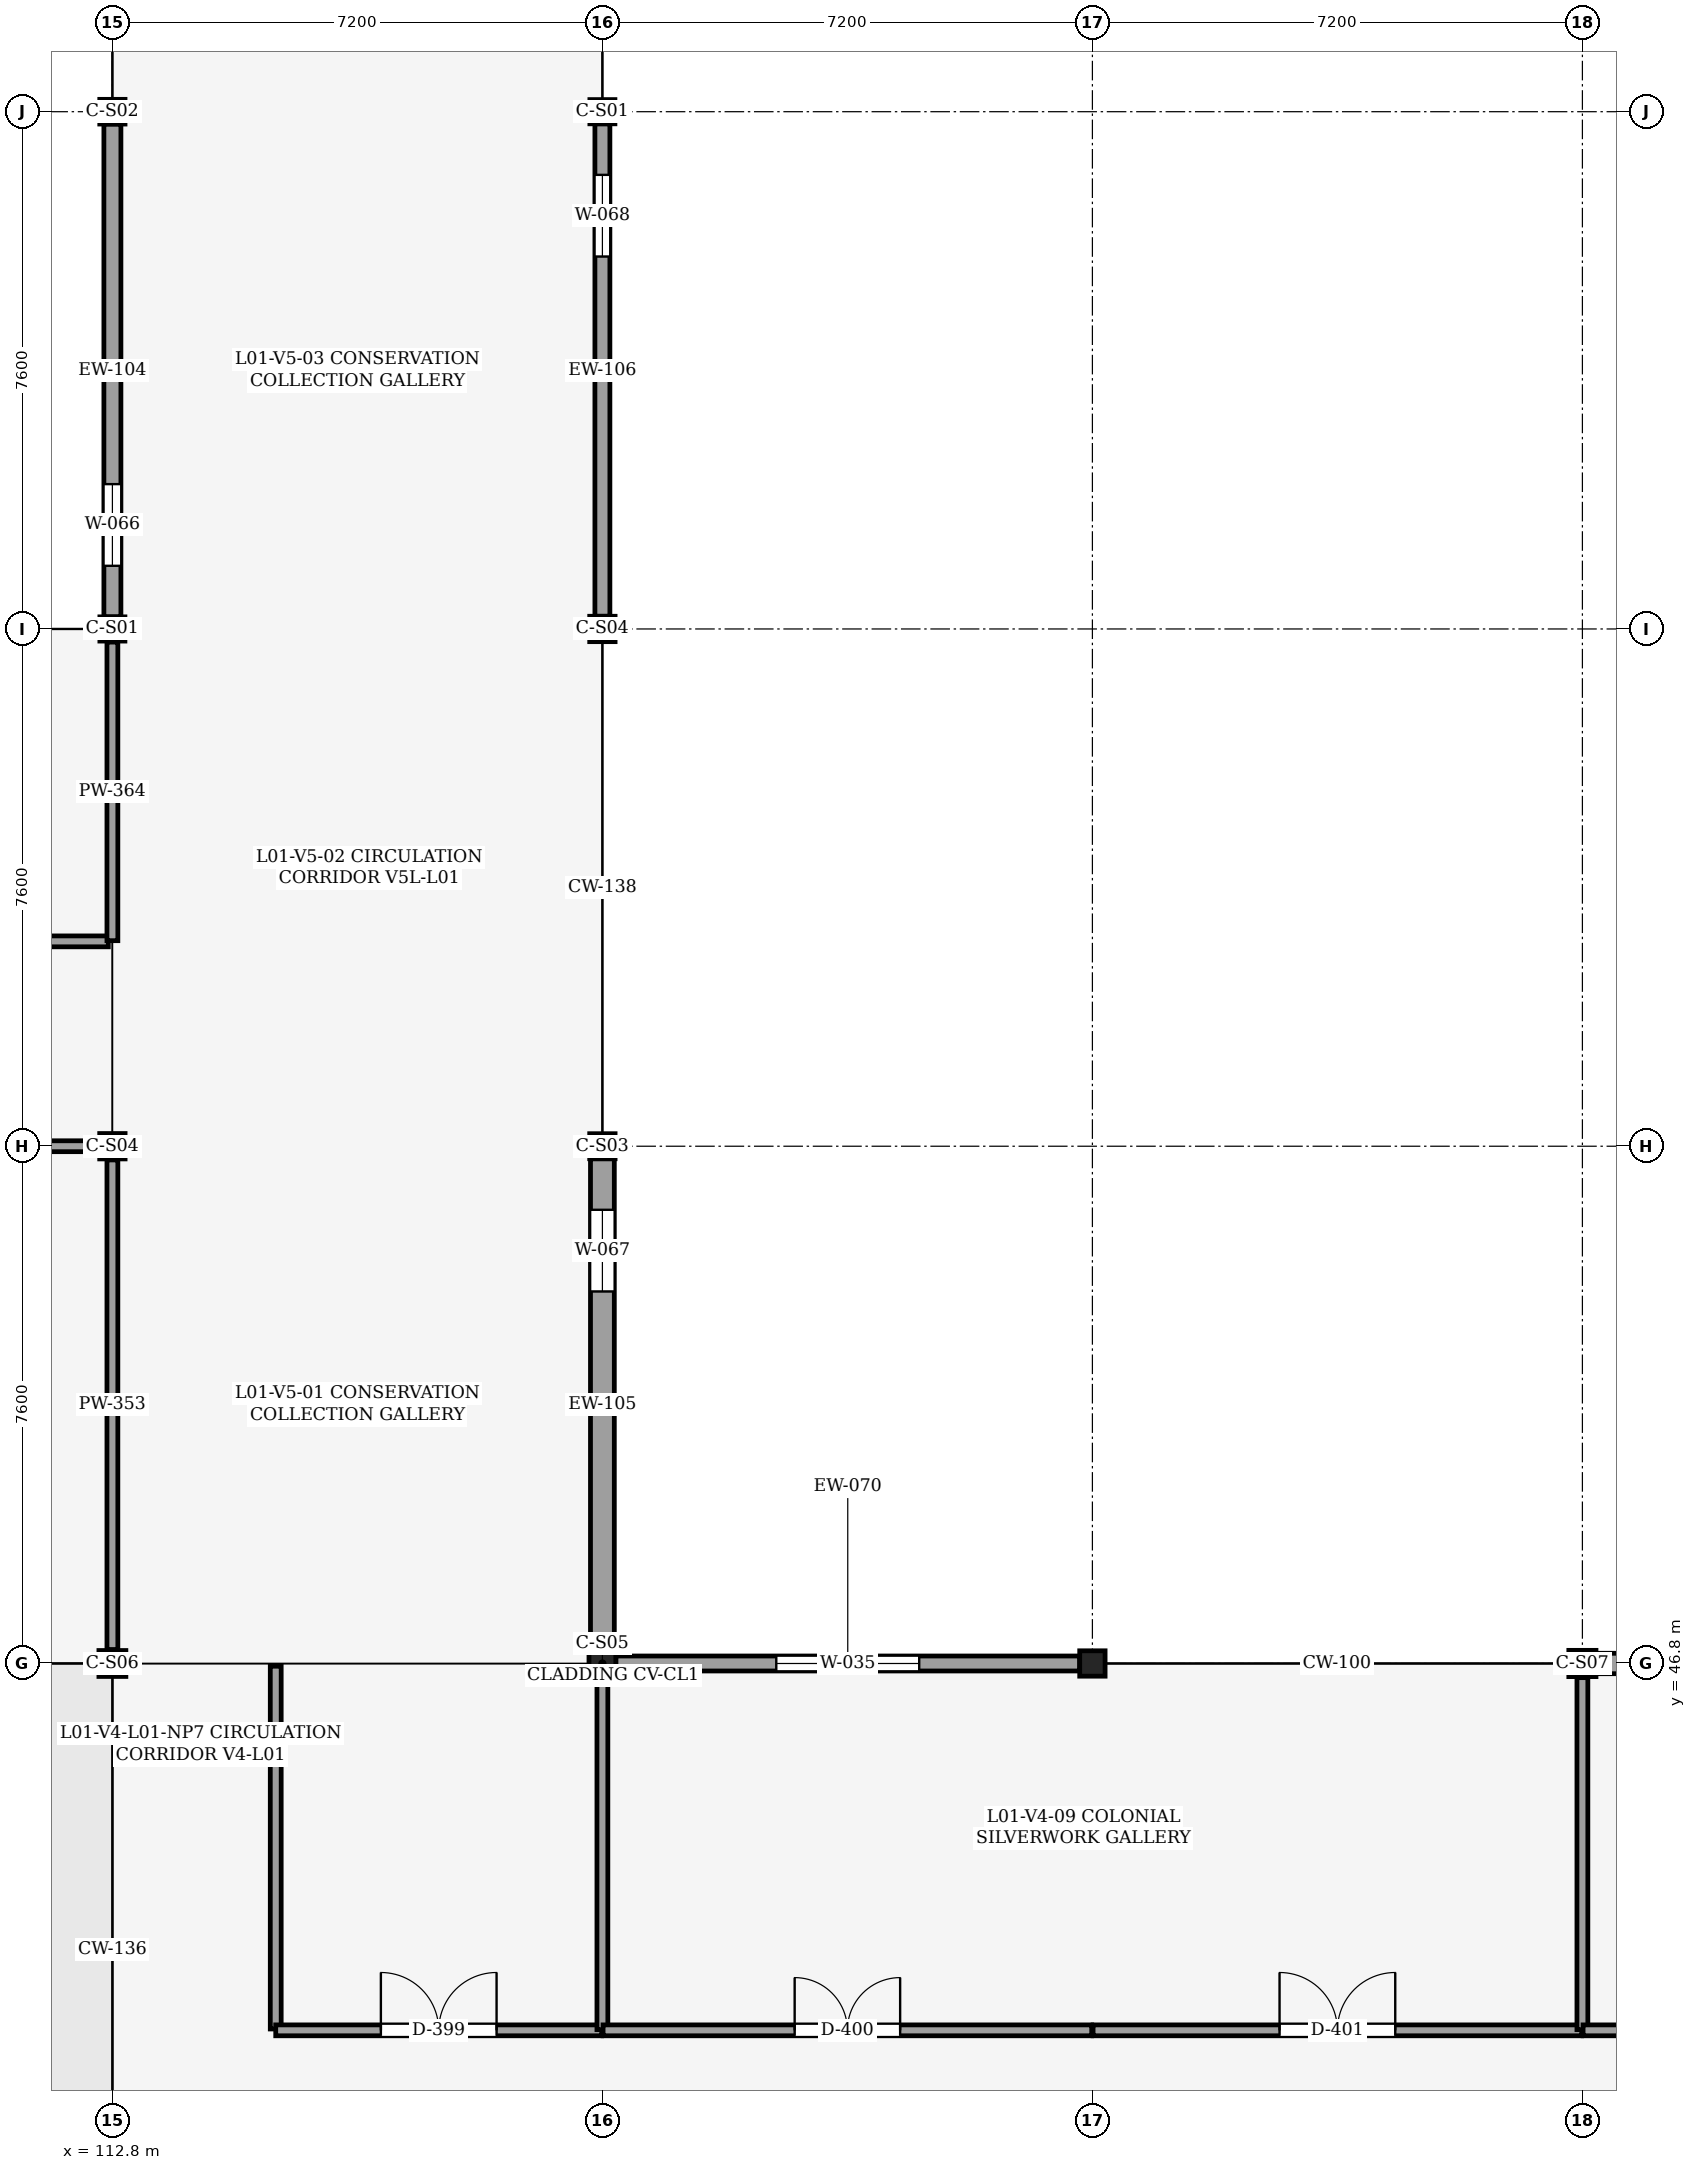
"""IFC4 building model, lengths in metres.
Left out: names, types, materials, properties, quantities, classifications, styles, units other than length and angle.
Written with IfcOpenShell. Run it as: python <this file> out.ifc"""

import sys

from ifc_helpers import new_model, si_unit, direction, frame, frame_2d, origin, origin_2d, place, context, subcontext, project, spatial, rectangle, i_section, extrude, element, fill, save


model = new_model("IFC4")
c1 = context("Model", 3, precision=1e-05, world=origin(), true_north=direction((0.0, 1.0)))
c2 = subcontext(c1, "Body", "Model", "MODEL_VIEW")
j1 = project(units=[si_unit("LENGTHUNIT", "METRE"), si_unit("PLANEANGLEUNIT", "RADIAN")], contexts=[c1])
p1 = place(None, origin())
s1 = spatial("IfcSite", under=j1, at=p1, CompositionType="ELEMENT")
p2 = place(p1, origin())
s2 = spatial("IfcBuilding", under=s1, at=p2, CompositionType="ELEMENT")
p3 = place(p2, frame((0.0, 0.0, 5.4)))
s3 = spatial("IfcBuildingStorey", under=s2, at=p3, CompositionType="ELEMENT", Elevation=5.4)
p4 = place(p3, frame((112.8, 46.8, 0.0), z_axis=(0.0, 0.0, 1.0), x_axis=(1.0, 0.0, 0.0)))
e1 = element("IfcColumn", 1, at=p4, inside=s3, PredefinedType="COLUMN", context=c2, shape_type="SweptSolid", body=[
    extrude(i_section(OverallWidth=0.396, OverallDepth=0.381, WebThickness=0.019, FlangeThickness=0.03, FilletRadius=0.025, at=origin_2d()), origin(), (0.0, 0.0, 1.0), 4.8),
])
p5 = place(p3, frame((112.8, 54.4, 0.0), z_axis=(0.0, 0.0, 1.0), x_axis=(1.0, 0.0, 0.0)))
e2 = element("IfcColumn", 2, at=p5, inside=s3, PredefinedType="COLUMN", context=c2, shape_type="SweptSolid", body=[
    extrude(i_section(OverallWidth=0.373, OverallDepth=0.373, WebThickness=0.016, FlangeThickness=0.026, FilletRadius=0.025, at=origin_2d()), origin(), (0.0, 0.0, 1.0), 4.8),
])
p6 = place(p3, frame((112.8, 62.0, 0.0), z_axis=(0.0, 0.0, 1.0), x_axis=(1.0, 0.0, 0.0)))
e3 = element("IfcColumn", 3, at=p6, inside=s3, PredefinedType="COLUMN", context=c2, shape_type="SweptSolid", body=[
    extrude(i_section(OverallWidth=0.368, OverallDepth=0.356, WebThickness=0.011, FlangeThickness=0.018, FilletRadius=0.025, at=origin_2d()), origin(), (0.0, 0.0, 1.0), 4.8),
])
p7 = place(p3, frame((112.8, 69.6, 0.0), z_axis=(0.0, 0.0, 1.0), x_axis=(1.0, 0.0, 0.0)))
e4 = element("IfcColumn", 4, at=p7, inside=s3, PredefinedType="COLUMN", context=c2, shape_type="SweptSolid", body=[
    extrude(i_section(OverallWidth=0.371, OverallDepth=0.363, WebThickness=0.013, FlangeThickness=0.022, FilletRadius=0.025, at=origin_2d()), origin(), (0.0, 0.0, 1.0), 4.8),
])
p8 = place(p3, frame((120.0, 46.8, 0.0), z_axis=(0.0, 0.0, 1.0), x_axis=(1.0, 0.0, 0.0)))
e5 = element("IfcColumn", 5, at=p8, inside=s3, PredefinedType="COLUMN", context=c2, shape_type="SweptSolid", body=[
    extrude(i_section(OverallWidth=0.394, OverallDepth=0.376, WebThickness=0.017, FlangeThickness=0.028, FilletRadius=0.025, at=origin_2d()), origin(), (0.0, 0.0, 1.0), 4.8),
])
p9 = place(p3, frame((120.0, 54.4, 0.0), z_axis=(0.0, 0.0, 1.0), x_axis=(1.0, 0.0, 0.0)))
e6 = element("IfcColumn", 6, at=p9, inside=s3, PredefinedType="COLUMN", context=c2, shape_type="SweptSolid", body=[
    extrude(i_section(OverallWidth=0.373, OverallDepth=0.368, WebThickness=0.015, FlangeThickness=0.024, FilletRadius=0.025, at=origin_2d()), origin(), (0.0, 0.0, 1.0), 4.8),
])
p10 = place(p3, frame((120.0, 62.0, 0.0), z_axis=(0.0, 0.0, 1.0), x_axis=(1.0, 0.0, 0.0)))
e7 = element("IfcColumn", 7, at=p10, inside=s3, PredefinedType="COLUMN", context=c2, shape_type="SweptSolid", body=[
    extrude(i_section(OverallWidth=0.373, OverallDepth=0.373, WebThickness=0.016, FlangeThickness=0.026, FilletRadius=0.025, at=origin_2d()), origin(), (0.0, 0.0, 1.0), 4.8),
])
p11 = place(p3, frame((120.0, 69.6, 0.0), z_axis=(0.0, 0.0, 1.0), x_axis=(1.0, 0.0, 0.0)))
e8 = element("IfcColumn", 8, at=p11, inside=s3, PredefinedType="COLUMN", context=c2, shape_type="SweptSolid", body=[
    extrude(i_section(OverallWidth=0.368, OverallDepth=0.356, WebThickness=0.011, FlangeThickness=0.018, FilletRadius=0.025, at=origin_2d()), origin(), (0.0, 0.0, 1.0), 4.8),
])
p12 = place(p3, frame((127.2, 46.8, 0.0), z_axis=(0.0, 0.0, 1.0), x_axis=(1.0, 0.0, 0.0)))
e9 = element("IfcColumn", 9, at=p12, inside=s3, PredefinedType="COLUMN", context=c2, shape_type="SweptSolid", body=[
    extrude(i_section(OverallWidth=0.373, OverallDepth=0.373, WebThickness=0.016, FlangeThickness=0.026, FilletRadius=0.025, at=origin_2d()), origin(), (0.0, 0.0, 1.0), 4.8),
])
p13 = place(p3, frame((134.4, 46.8, 0.0), z_axis=(0.0, 0.0, 1.0), x_axis=(1.0, 0.0, 0.0)))
e10 = element("IfcColumn", 10, at=p13, inside=s3, PredefinedType="COLUMN", context=c2, shape_type="SweptSolid", body=[
    extrude(i_section(OverallWidth=0.399, OverallDepth=0.386, WebThickness=0.021, FlangeThickness=0.033, FilletRadius=0.025, at=origin_2d()), origin(), (0.0, 0.0, 1.0), 4.8),
])
p14 = place(p3, frame((120.197, 46.8, 0.0), z_axis=(0.0, 0.0, 1.0), x_axis=(1.0, 0.0, 0.0)))
e11 = element("IfcWall", 11, at=p14, inside=s3, PredefinedType="SOLIDWALL", context=c2, shape_type="SweptSolid", body=[
    extrude(rectangle(XDim=6.816, YDim=0.22, at=frame_2d((3.408, 0.0))), origin(), (0.0, 0.0, 1.0), 4.215),
])
p15 = place(p14, frame((2.358, 0.0, 0.9)))
e12 = element("IfcOpeningElement", 12, at=p15, cuts=e11, PredefinedType="OPENING", context=c2, shape_type="SweptSolid", body=[
    extrude(rectangle(XDim=2.1, YDim=1.75, at=frame_2d((1.05, 0.875))), frame((0.0, 0.12, 0.0), z_axis=(0.0, -1.0, 0.0), x_axis=(1.0, 0.0, 0.0)), (0.0, 0.0, 1.0), 0.24),
])
p16 = place(p3, frame((134.6, 46.8, 0.0), z_axis=(0.0, 0.0, 1.0), x_axis=(1.0, 0.0, 0.0)))
e13 = element("IfcWall", 13, at=p16, inside=s3, PredefinedType="SOLIDWALL", context=c2, shape_type="SweptSolid", body=[
    extrude(rectangle(XDim=6.802, YDim=0.3, at=frame_2d((3.401, 0.0))), origin(), (0.0, 0.0, 1.0), 3.987),
])
p17 = place(p16, frame((2.201, 0.0, 0.9)))
e14 = element("IfcOpeningElement", 14, at=p17, cuts=e13, PredefinedType="OPENING", context=c2, shape_type="SweptSolid", body=[
    extrude(rectangle(XDim=2.4, YDim=1.75, at=frame_2d((1.2, 0.875))), frame((0.0, 0.16, 0.0), z_axis=(0.0, -1.0, 0.0), x_axis=(1.0, 0.0, 0.0)), (0.0, 0.0, 1.0), 0.321),
])
p18 = place(p3, frame((112.8, 62.178, 0.0), z_axis=(0.0, 0.0, 1.0), x_axis=(0.0, 1.0, 0.0)))
e15 = element("IfcWall", 15, at=p18, inside=s3, PredefinedType="SOLIDWALL", context=c2, shape_type="SweptSolid", body=[
    extrude(rectangle(XDim=7.24, YDim=0.25, at=frame_2d((3.62, 0.0))), origin(), (0.0, 0.0, 1.0), 3.913),
])
p19 = place(p18, frame((0.75, 0.0, 0.9)))
e16 = element("IfcOpeningElement", 16, at=p19, cuts=e15, PredefinedType="OPENING", context=c2, shape_type="SweptSolid", body=[
    extrude(rectangle(XDim=1.2, YDim=1.5, at=frame_2d((0.6, 0.75))), frame((0.0, 0.135, 0.0), z_axis=(0.0, -1.0, 0.0), x_axis=(1.0, 0.0, 0.0)), (0.0, 0.0, 1.0), 0.271),
])
p20 = place(p3, frame((120.0, 54.216, 0.0), z_axis=(0.0, 0.0, 1.0), x_axis=(0.0, -1.0, 0.0)))
e17 = element("IfcWall", 17, at=p20, inside=s3, PredefinedType="SOLIDWALL", context=c2, shape_type="SweptSolid", body=[
    extrude(rectangle(XDim=7.228, YDim=0.35, at=frame_2d((3.614, 0.0))), origin(), (0.0, 0.0, 1.0), 3.908),
])
p21 = place(p20, frame((0.75, 0.0, 0.9)))
e18 = element("IfcOpeningElement", 18, at=p21, cuts=e17, PredefinedType="OPENING", context=c2, shape_type="SweptSolid", body=[
    extrude(rectangle(XDim=1.2, YDim=1.5, at=frame_2d((0.6, 0.75))), frame((0.0, 0.185, 0.0), z_axis=(0.0, -1.0, 0.0), x_axis=(1.0, 0.0, 0.0)), (0.0, 0.0, 1.0), 0.371),
])
p22 = place(p3, frame((120.0, 69.422, 0.0), z_axis=(0.0, 0.0, 1.0), x_axis=(0.0, -1.0, 0.0)))
e19 = element("IfcWall", 19, at=p22, inside=s3, PredefinedType="SOLIDWALL", context=c2, shape_type="SweptSolid", body=[
    extrude(rectangle(XDim=7.236, YDim=0.22, at=frame_2d((3.618, 0.0))), origin(), (0.0, 0.0, 1.0), 3.987),
])
p23 = place(p22, frame((0.75, 0.0, 0.9)))
e20 = element("IfcOpeningElement", 20, at=p23, cuts=e19, PredefinedType="OPENING", context=c2, shape_type="SweptSolid", body=[
    extrude(rectangle(XDim=1.2, YDim=1.5, at=frame_2d((0.6, 0.75))), frame((0.0, 0.12, 0.0), z_axis=(0.0, -1.0, 0.0), x_axis=(1.0, 0.0, 0.0)), (0.0, 0.0, 1.0), 0.24),
])
p24 = place(p3, frame((104.542, 54.4, 0.0), z_axis=(0.0, 0.0, 1.0), x_axis=(1.0, 0.0, 0.0)))
e21 = element("IfcWall", 21, at=p24, inside=s3, PredefinedType="PARTITIONING", context=c2, shape_type="SweptSolid", body=[
    extrude(rectangle(XDim=8.056, YDim=0.16, at=frame_2d((4.028, 0.0))), origin(), (0.0, 0.0, 1.0), 3.758),
])
p25 = place(p24, frame((3.253, 0.0, 0.0)))
e22 = element("IfcOpeningElement", 22, at=p25, cuts=e21, PredefinedType="OPENING", context=c2, shape_type="SweptSolid", body=[
    extrude(rectangle(XDim=1.55, YDim=2.3, at=frame_2d((0.775, 1.15))), frame((0.0, 0.09, 0.0), z_axis=(0.0, -1.0, 0.0), x_axis=(1.0, 0.0, 0.0)), (0.0, 0.0, 1.0), 0.18),
])
p26 = place(p3, frame((112.8, 47.006, 0.0), z_axis=(0.0, 0.0, 1.0), x_axis=(0.0, 1.0, 0.0)))
e23 = element("IfcWall", 23, at=p26, inside=s3, PredefinedType="PARTITIONING", context=c2, shape_type="SweptSolid", body=[
    extrude(rectangle(XDim=7.193, YDim=0.16, at=frame_2d((3.596, 0.0))), origin(), (0.0, 0.0, 1.0), 4.058),
])
p27 = place(p3, frame((104.41, 57.41, 0.0), z_axis=(0.0, 0.0, 1.0), x_axis=(1.0, 0.0, 0.0)))
e24 = element("IfcWall", 24, at=p27, inside=s3, PredefinedType="PARTITIONING", context=c2, shape_type="SweptSolid", body=[
    extrude(rectangle(XDim=8.33, YDim=0.16, at=frame_2d((4.165, 0.0))), origin(), (0.0, 0.0, 1.0), 4.52),
])
p28 = place(p27, frame((3.64, 0.0, 0.0)))
e25 = element("IfcOpeningElement", 25, at=p28, cuts=e24, PredefinedType="OPENING", context=c2, shape_type="SweptSolid", body=[
    extrude(rectangle(XDim=1.05, YDim=2.15, at=frame_2d((0.525, 1.075))), frame((0.0, 0.09, 0.0), z_axis=(0.0, -1.0, 0.0), x_axis=(1.0, 0.0, 0.0)), (0.0, 0.0, 1.0), 0.18),
])
p29 = place(p3, frame((112.8, 57.42, 0.0), z_axis=(0.0, 0.0, 1.0), x_axis=(0.0, 1.0, 0.0)))
e26 = element("IfcWall", 26, at=p29, inside=s3, PredefinedType="PARTITIONING", context=c2, shape_type="SweptSolid", body=[
    extrude(rectangle(XDim=4.387, YDim=0.16, at=frame_2d((2.193, 0.0))), origin(), (0.0, 0.0, 1.0), 3.908),
])
p30 = place(p3, frame((115.2, 41.43, 0.0), z_axis=(0.0, 0.0, 1.0), x_axis=(0.0, 1.0, 0.0)))
e27 = element("IfcWall", 27, at=p30, inside=s3, PredefinedType="PARTITIONING", context=c2, shape_type="SweptSolid", body=[
    extrude(rectangle(XDim=5.33, YDim=0.16, at=frame_2d((2.665, 0.0))), origin(), (0.0, 0.0, 1.0), 4.52),
])
p31 = place(p3, frame((115.2, 41.41, 0.0), z_axis=(0.0, 0.0, 1.0), x_axis=(1.0, 0.0, 0.0)))
e28 = element("IfcWall", 28, at=p31, inside=s3, PredefinedType="PARTITIONING", context=c2, shape_type="SweptSolid", body=[
    extrude(rectangle(XDim=4.79, YDim=0.16, at=frame_2d((2.395, 0.0))), origin(), (0.0, 0.0, 1.0), 4.52),
])
p32 = place(p31, frame((1.545, 0.0, 0.0)))
e29 = element("IfcOpeningElement", 29, at=p32, cuts=e28, PredefinedType="OPENING", context=c2, shape_type="SweptSolid", body=[
    extrude(rectangle(XDim=1.7, YDim=2.4, at=frame_2d((0.85, 1.2))), frame((0.0, 0.09, 0.0), z_axis=(0.0, -1.0, 0.0), x_axis=(1.0, 0.0, 0.0)), (0.0, 0.0, 1.0), 0.18),
])
p33 = place(p3, frame((120.0, 41.42, 0.0), z_axis=(0.0, 0.0, 1.0), x_axis=(0.0, 1.0, 0.0)))
e30 = element("IfcWall", 30, at=p33, inside=s3, PredefinedType="PARTITIONING", context=c2, shape_type="SweptSolid", body=[
    extrude(rectangle(XDim=5.177, YDim=0.16, at=frame_2d((2.588, 0.0))), origin(), (0.0, 0.0, 1.0), 3.827),
])
p34 = place(p3, frame((120.01, 41.41, 0.0), z_axis=(0.0, 0.0, 1.0), x_axis=(1.0, 0.0, 0.0)))
e31 = element("IfcWall", 31, at=p34, inside=s3, PredefinedType="PARTITIONING", context=c2, shape_type="SweptSolid", body=[
    extrude(rectangle(XDim=7.18, YDim=0.16, at=frame_2d((3.59, 0.0))), origin(), (0.0, 0.0, 1.0), 4.52),
])
p35 = place(p34, frame((2.815, 0.0, 0.0)))
e32 = element("IfcOpeningElement", 32, at=p35, cuts=e31, PredefinedType="OPENING", context=c2, shape_type="SweptSolid", body=[
    extrude(rectangle(XDim=1.55, YDim=2.3, at=frame_2d((0.775, 1.15))), frame((0.0, 0.09, 0.0), z_axis=(0.0, -1.0, 0.0), x_axis=(1.0, 0.0, 0.0)), (0.0, 0.0, 1.0), 0.18),
])
p36 = place(p3, frame((127.21, 41.41, 0.0), z_axis=(0.0, 0.0, 1.0), x_axis=(1.0, 0.0, 0.0)))
e33 = element("IfcWall", 33, at=p36, inside=s3, PredefinedType="PARTITIONING", context=c2, shape_type="SweptSolid", body=[
    extrude(rectangle(XDim=7.18, YDim=0.16, at=frame_2d((3.59, 0.0))), origin(), (0.0, 0.0, 1.0), 4.52),
])
p37 = place(p36, frame((2.74, 0.0, 0.0)))
e34 = element("IfcOpeningElement", 34, at=p37, cuts=e33, PredefinedType="OPENING", context=c2, shape_type="SweptSolid", body=[
    extrude(rectangle(XDim=1.7, YDim=2.4, at=frame_2d((0.85, 1.2))), frame((0.0, 0.09, 0.0), z_axis=(0.0, -1.0, 0.0), x_axis=(1.0, 0.0, 0.0)), (0.0, 0.0, 1.0), 0.18),
])
p38 = place(p3, frame((134.4, 41.42, 0.0), z_axis=(0.0, 0.0, 1.0), x_axis=(0.0, 1.0, 0.0)))
e35 = element("IfcWall", 35, at=p38, inside=s3, PredefinedType="PARTITIONING", context=c2, shape_type="SweptSolid", body=[
    extrude(rectangle(XDim=5.172, YDim=0.16, at=frame_2d((2.586, 0.0))), origin(), (0.0, 0.0, 1.0), 3.664),
])
p39 = place(p3, frame((134.41, 41.41, 0.0), z_axis=(0.0, 0.0, 1.0), x_axis=(1.0, 0.0, 0.0)))
e36 = element("IfcWall", 36, at=p39, inside=s3, PredefinedType="PARTITIONING", context=c2, shape_type="SweptSolid", body=[
    extrude(rectangle(XDim=7.18, YDim=0.16, at=frame_2d((3.59, 0.0))), origin(), (0.0, 0.0, 1.0), 4.52),
])
p40 = place(p39, frame((2.54, 0.0, 0.0)))
e37 = element("IfcOpeningElement", 37, at=p40, cuts=e36, PredefinedType="OPENING", context=c2, shape_type="SweptSolid", body=[
    extrude(rectangle(XDim=2.1, YDim=2.5, at=frame_2d((1.05, 1.25))), frame((0.0, 0.09, 0.0), z_axis=(0.0, -1.0, 0.0), x_axis=(1.0, 0.0, 0.0)), (0.0, 0.0, 1.0), 0.18),
])
p41 = place(p15, origin())
e38 = element("IfcWindow", 38, at=p41, inside=s3, PartitioningType="SINGLE_PANEL", PredefinedType="WINDOW", context=c2, shape_type="SweptSolid", body=[
    extrude(rectangle(XDim=2.1, YDim=1.75, at=frame_2d((1.05, 0.875))), frame((0.0, 0.03, 0.0), z_axis=(0.0, -1.0, 0.0), x_axis=(1.0, 0.0, 0.0)), (0.0, 0.0, 1.0), 0.06),
])
fill(e12, e38)
p42 = place(p19, origin())
e39 = element("IfcWindow", 39, at=p42, inside=s3, PartitioningType="SINGLE_PANEL", PredefinedType="WINDOW", context=c2, shape_type="SweptSolid", body=[
    extrude(rectangle(XDim=1.2, YDim=1.5, at=frame_2d((0.6, 0.75))), frame((0.0, 0.03, 0.0), z_axis=(0.0, -1.0, 0.0), x_axis=(1.0, 0.0, 0.0)), (0.0, 0.0, 1.0), 0.06),
])
fill(e16, e39)
p43 = place(p21, origin())
e40 = element("IfcWindow", 40, at=p43, inside=s3, PartitioningType="SINGLE_PANEL", PredefinedType="WINDOW", context=c2, shape_type="SweptSolid", body=[
    extrude(rectangle(XDim=1.2, YDim=1.5, at=frame_2d((0.6, 0.75))), frame((0.0, 0.03, 0.0), z_axis=(0.0, -1.0, 0.0), x_axis=(1.0, 0.0, 0.0)), (0.0, 0.0, 1.0), 0.06),
])
fill(e18, e40)
p44 = place(p23, origin())
e41 = element("IfcWindow", 41, at=p44, inside=s3, PartitioningType="SINGLE_PANEL", PredefinedType="WINDOW", context=c2, shape_type="SweptSolid", body=[
    extrude(rectangle(XDim=1.2, YDim=1.5, at=frame_2d((0.6, 0.75))), frame((0.0, 0.03, 0.0), z_axis=(0.0, -1.0, 0.0), x_axis=(1.0, 0.0, 0.0)), (0.0, 0.0, 1.0), 0.06),
])
fill(e20, e41)
p45 = place(p32, origin())
e42 = element("IfcDoor", 42, at=p45, inside=s3, OperationType="DOUBLE_DOOR_SINGLE_SWING", PredefinedType="DOOR", context=c2, shape_type="SweptSolid", body=[
    extrude(rectangle(XDim=1.7, YDim=2.4, at=frame_2d((0.85, 1.2))), frame((0.0, 0.025, 0.0), z_axis=(0.0, -1.0, 0.0), x_axis=(1.0, 0.0, 0.0)), (0.0, 0.0, 1.0), 0.05),
])
fill(e29, e42)
p46 = place(p35, origin())
e43 = element("IfcDoor", 43, at=p46, inside=s3, OperationType="DOUBLE_DOOR_SINGLE_SWING", PredefinedType="DOOR", context=c2, shape_type="SweptSolid", body=[
    extrude(rectangle(XDim=1.55, YDim=2.3, at=frame_2d((0.775, 1.15))), frame((0.0, 0.025, 0.0), z_axis=(0.0, -1.0, 0.0), x_axis=(1.0, 0.0, 0.0)), (0.0, 0.0, 1.0), 0.05),
])
fill(e32, e43)
p47 = place(p37, origin())
e44 = element("IfcDoor", 44, at=p47, inside=s3, OperationType="DOUBLE_DOOR_SINGLE_SWING", PredefinedType="DOOR", context=c2, shape_type="SweptSolid", body=[
    extrude(rectangle(XDim=1.7, YDim=2.4, at=frame_2d((0.85, 1.2))), frame((0.0, 0.025, 0.0), z_axis=(0.0, -1.0, 0.0), x_axis=(1.0, 0.0, 0.0)), (0.0, 0.0, 1.0), 0.05),
])
fill(e34, e44)
save(model, sys.argv[1])
